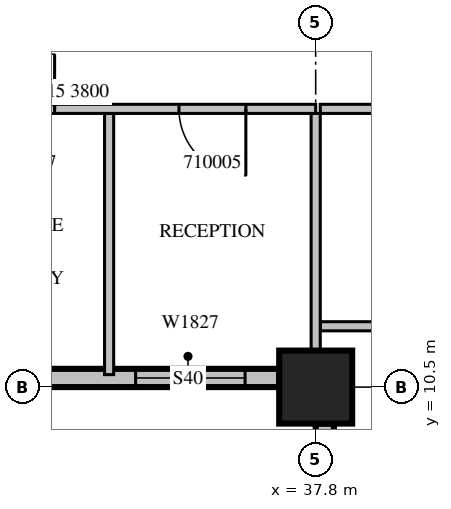
"""IFC4 building model, lengths in metres.
Left out: names, types, materials, properties, quantities, classifications, styles, units other than length and angle.
Written with IfcOpenShell. Run it as: python <this file> out.ifc"""

import sys

from ifc_helpers import new_model, si_unit, direction, frame, frame_2d, origin, origin_2d, place, context, subcontext, project, spatial, rectangle, extrude, source, transform, mapped, element, fill, save


model = new_model("IFC4")
c1 = context("Model", 3, precision=1e-05, world=origin(), true_north=direction((0.0, 1.0)))
c2 = subcontext(c1, "Body", "Model", "MODEL_VIEW")
j1 = project(units=[si_unit("LENGTHUNIT", "METRE"), si_unit("PLANEANGLEUNIT", "RADIAN")], contexts=[c1])
p1 = place(None, origin())
s1 = spatial("IfcSite", under=j1, at=p1, CompositionType="ELEMENT")
p2 = place(p1, origin())
s2 = spatial("IfcBuilding", under=s1, at=p2, CompositionType="ELEMENT")
p3 = place(p2, frame((0.0, 0.0, 53.1)))
s3 = spatial("IfcBuildingStorey", under=s2, at=p3, CompositionType="ELEMENT", Elevation=53.1)
m1 = source(origin(), c2, "Body", "SweptSolid", [
    extrude(rectangle(XDim=1.2, YDim=1.2, at=origin_2d()), origin(), (0.0, 0.0, 1.0), 4.2),
])
p4 = place(p3, frame((37.8, 10.5, 0.0), z_axis=(0.0, 0.0, 1.0), x_axis=(1.0, 0.0, 0.0)))
e1 = element("IfcColumn", 1, at=p4, inside=s3, PredefinedType="COLUMN", context=c2, shape_type="MappedRepresentation", body=[
    mapped(m1, transform((0.0, 0.0, 0.0), scale=1.0)),
])
m2 = source(origin(), c2, "Body", "SweptSolid", [
    extrude(rectangle(XDim=7.2, YDim=0.3, at=frame_2d((3.6, 0.0))), origin(), (0.0, 0.0, 1.0), 3.8),
])
p5 = place(p3, frame((30.0, 10.65, 0.0), z_axis=(0.0, 0.0, 1.0), x_axis=(1.0, 0.0, 0.0)))
e2 = element("IfcWall", 2, at=p5, inside=s3, PredefinedType="STANDARD", context=c2, shape_type="MappedRepresentation", body=[
    mapped(m2, transform((0.0, 0.0, 0.0), scale=1.0)),
])
m3 = source(origin(), c2, "Body", "SweptSolid", [
    extrude(rectangle(XDim=1.8, YDim=2.7, at=frame_2d((0.9, 1.35))), frame((0.0, 0.16, 0.0), z_axis=(0.0, -1.0, 0.0), x_axis=(1.0, 0.0, 0.0)), (0.0, 0.0, 1.0), 0.32),
])
p6 = place(p5, frame((4.839, 0.0, 0.6)))
e3 = element("IfcOpeningElement", 3, at=p6, cuts=e2, PredefinedType="OPENING", context=c2, shape_type="MappedRepresentation", body=[
    mapped(m3, transform((0.0, 0.0, 0.0), scale=1.0)),
])
m4 = source(origin(), c2, "Body", "SweptSolid", [
    extrude(rectangle(XDim=1.2, YDim=2.7, at=frame_2d((0.6, 1.35))), frame((0.0, 0.16, 0.0), z_axis=(0.0, -1.0, 0.0), x_axis=(1.0, 0.0, 0.0)), (0.0, 0.0, 1.0), 0.32),
])
p7 = place(p5, frame((2.152, 0.0, 0.6)))
e4 = element("IfcOpeningElement", 4, at=p7, cuts=e2, PredefinedType="OPENING", context=c2, shape_type="MappedRepresentation", body=[
    mapped(m4, transform((0.0, 0.0, 0.0), scale=1.0)),
])
m5 = source(origin(), c2, "Body", "SweptSolid", [
    extrude(rectangle(XDim=8.7, YDim=0.3, at=frame_2d((4.35, 0.0))), origin(), (0.0, 0.0, 1.0), 3.8),
])
p8 = place(p3, frame((37.95, 9.9, 0.0), z_axis=(0.0, 0.0, 1.0), x_axis=(0.0, -1.0, 0.0)))
e5 = element("IfcWall", 5, at=p8, inside=s3, PredefinedType="STANDARD", context=c2, shape_type="MappedRepresentation", body=[
    mapped(m5, transform((0.0, 0.0, 0.0), scale=1.0)),
])
p9 = place(p8, frame((1.812, 0.0, 0.6)))
e6 = element("IfcOpeningElement", 6, at=p9, cuts=e5, PredefinedType="OPENING", context=c2, shape_type="MappedRepresentation", body=[
    mapped(m3, transform((0.0, 0.0, 0.0), scale=1.0)),
])
m6 = source(origin(), c2, "Body", "SweptSolid", [
    extrude(rectangle(XDim=2.4, YDim=2.7, at=frame_2d((1.2, 1.35))), frame((0.0, 0.16, 0.0), z_axis=(0.0, -1.0, 0.0), x_axis=(1.0, 0.0, 0.0)), (0.0, 0.0, 1.0), 0.32),
])
p10 = place(p8, frame((6.075, 0.0, 0.6)))
e7 = element("IfcOpeningElement", 7, at=p10, cuts=e5, PredefinedType="OPENING", context=c2, shape_type="MappedRepresentation", body=[
    mapped(m6, transform((0.0, 0.0, 0.0), scale=1.0)),
])
m7 = source(origin(), c2, "Body", "SweptSolid", [
    extrude(rectangle(XDim=6.45, YDim=0.15, at=frame_2d((3.225, 0.0))), origin(), (0.0, 0.0, 1.0), 3.8),
])
p11 = place(p3, frame((37.875, 11.5, 0.0), z_axis=(0.0, 0.0, 1.0), x_axis=(1.0, 0.0, 0.0)))
e8 = element("IfcWall", 8, at=p11, inside=s3, PredefinedType="PARTITIONING", context=c2, shape_type="MappedRepresentation", body=[
    mapped(m7, transform((0.0, 0.0, 0.0), scale=1.0)),
])
p12 = place(p3, frame((44.325, 15.075, 0.0), z_axis=(0.0, 0.0, 1.0), x_axis=(-1.0, 0.0, 0.0)))
e9 = element("IfcWall", 9, at=p12, inside=s3, PredefinedType="PARTITIONING", context=c2, shape_type="MappedRepresentation", body=[
    mapped(m7, transform((0.0, 0.0, 0.0), scale=1.0)),
])
m8 = source(origin(), c2, "Body", "SweptSolid", [
    extrude(rectangle(XDim=0.9, YDim=2.1, at=frame_2d((0.45, 1.05))), frame((0.0, 0.085, 0.0), z_axis=(0.0, -1.0, 0.0), x_axis=(1.0, 0.0, 0.0)), (0.0, 0.0, 1.0), 0.17),
])
p13 = place(p12, frame((2.812, 0.0, 0.0)))
e10 = element("IfcOpeningElement", 10, at=p13, cuts=e9, PredefinedType="OPENING", context=c2, shape_type="MappedRepresentation", body=[
    mapped(m8, transform((0.0, 0.0, 0.0), scale=1.0)),
])
m9 = source(origin(), c2, "Body", "SweptSolid", [
    extrude(rectangle(XDim=4.295, YDim=0.15, at=frame_2d((2.147, 0.0))), origin(), (0.0, 0.0, 1.0), 3.8),
])
p14 = place(p3, frame((34.403, 10.705, 0.0), z_axis=(0.0, 0.0, 1.0), x_axis=(0.0, 1.0, 0.0)))
e11 = element("IfcWall", 11, at=p14, inside=s3, PredefinedType="PARTITIONING", context=c2, shape_type="MappedRepresentation", body=[
    mapped(m9, transform((0.0, 0.0, 0.0), scale=1.0)),
])
m10 = source(origin(), c2, "Body", "SweptSolid", [
    extrude(rectangle(XDim=3.901, YDim=0.15, at=frame_2d((1.95, 0.0))), origin(), (0.0, 0.0, 1.0), 3.8),
])
p15 = place(p3, frame((37.8, 11.099, 0.0), z_axis=(0.0, 0.0, 1.0), x_axis=(0.0, 1.0, 0.0)))
e12 = element("IfcWall", 12, at=p15, inside=s3, PredefinedType="PARTITIONING", context=c2, shape_type="MappedRepresentation", body=[
    mapped(m10, transform((0.0, 0.0, 0.0), scale=1.0)),
])
m11 = source(origin(), c2, "Body", "SweptSolid", [
    extrude(rectangle(XDim=8.4, YDim=0.15, at=frame_2d((4.2, 0.0))), origin(), (0.0, 0.0, 1.0), 3.8),
])
p16 = place(p3, frame((37.8, 15.075, 0.0), z_axis=(0.0, 0.0, 1.0), x_axis=(-1.0, 0.0, 0.0)))
e13 = element("IfcWall", 13, at=p16, inside=s3, PredefinedType="PARTITIONING", context=c2, shape_type="MappedRepresentation", body=[
    mapped(m11, transform((0.0, 0.0, 0.0), scale=1.0)),
])
m12 = source(origin(), c2, "Body", "SweptSolid", [
    extrude(rectangle(XDim=1.1, YDim=2.1, at=frame_2d((0.55, 1.05))), frame((0.0, 0.085, 0.0), z_axis=(0.0, -1.0, 0.0), x_axis=(1.0, 0.0, 0.0)), (0.0, 0.0, 1.0), 0.17),
])
p17 = place(p16, frame((1.149, 0.0, 0.0)))
e14 = element("IfcOpeningElement", 14, at=p17, cuts=e13, PredefinedType="OPENING", context=c2, shape_type="MappedRepresentation", body=[
    mapped(m12, transform((0.0, 0.0, 0.0), scale=1.0)),
])
p18 = place(p16, frame((6.795, 0.0, 0.0)))
e15 = element("IfcOpeningElement", 15, at=p18, cuts=e13, PredefinedType="OPENING", context=c2, shape_type="MappedRepresentation", body=[
    mapped(m8, transform((0.0, 0.0, 0.0), scale=1.0)),
])
p19 = place(p16, frame((4.293, 0.0, 0.0)))
e16 = element("IfcOpeningElement", 16, at=p19, cuts=e13, PredefinedType="OPENING", context=c2, shape_type="MappedRepresentation", body=[
    mapped(m8, transform((0.0, 0.0, 0.0), scale=1.0)),
])
m13 = source(origin(), c2, "Body", "SweptSolid", [
    extrude(rectangle(XDim=1.8, YDim=2.7, at=frame_2d((0.9, 1.35))), frame((0.0, 0.03, 0.0), z_axis=(0.0, -1.0, 0.0), x_axis=(1.0, 0.0, 0.0)), (0.0, 0.0, 1.0), 0.06),
])
p20 = place(p6, origin())
e17 = element("IfcWindow", 17, at=p20, inside=s3, PartitioningType="SINGLE_PANEL", PredefinedType="WINDOW", context=c2, shape_type="MappedRepresentation", body=[
    mapped(m13, transform((0.0, 0.0, 0.0), scale=1.0)),
])
fill(e3, e17)
m14 = source(origin(), c2, "Body", "SweptSolid", [
    extrude(rectangle(XDim=1.1, YDim=2.1, at=frame_2d((0.55, 1.05))), frame((0.0, 0.025, 0.0), z_axis=(0.0, -1.0, 0.0), x_axis=(1.0, 0.0, 0.0)), (0.0, 0.0, 1.0), 0.05),
])
p21 = place(p17, origin())
e18 = element("IfcDoor", 18, at=p21, inside=s3, OperationType="SINGLE_SWING_LEFT", PredefinedType="DOOR", context=c2, shape_type="MappedRepresentation", body=[
    mapped(m14, transform((0.0, 0.0, 0.0), scale=1.0)),
])
fill(e14, e18)
m15 = source(origin(), c2, "Body", "SweptSolid", [
    extrude(rectangle(XDim=0.9, YDim=2.1, at=frame_2d((0.45, 1.05))), frame((0.0, 0.025, 0.0), z_axis=(0.0, -1.0, 0.0), x_axis=(1.0, 0.0, 0.0)), (0.0, 0.0, 1.0), 0.05),
])
p22 = place(p19, origin())
e19 = element("IfcDoor", 19, at=p22, inside=s3, OperationType="SINGLE_SWING_RIGHT", PredefinedType="DOOR", context=c2, shape_type="MappedRepresentation", body=[
    mapped(m15, transform((0.0, 0.0, 0.0), scale=1.0)),
])
fill(e16, e19)
save(model, sys.argv[1])
